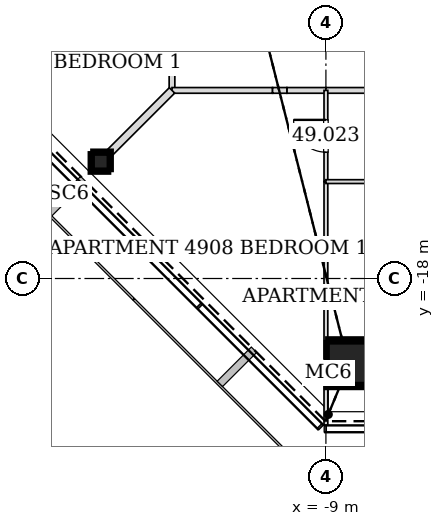
"""IFC4 building model, lengths in metres.
Left out: names, types, materials, properties, quantities, classifications, styles, units other than length and angle.
Written with IfcOpenShell. Run it as: python <this file> out.ifc"""

import sys

from ifc_helpers import new_model, si_unit, direction, frame, frame_2d, origin, origin_2d, place, context, subcontext, project, spatial, rectangle, hollow_rectangle, extrude, element, fill, save


model = new_model("IFC4")
c1 = context("Model", 3, precision=1e-05, world=origin(), true_north=direction((0.0, 1.0)))
c2 = subcontext(c1, "Body", "Model", "MODEL_VIEW")
j1 = project(units=[si_unit("LENGTHUNIT", "METRE"), si_unit("PLANEANGLEUNIT", "RADIAN")], contexts=[c1])
p1 = place(None, origin())
s1 = spatial("IfcSite", under=j1, at=p1, CompositionType="ELEMENT")
p2 = place(p1, origin())
s2 = spatial("IfcBuilding", under=s1, at=p2, CompositionType="ELEMENT")
p3 = place(p2, frame((0.0, 0.0, 214.2)))
s3 = spatial("IfcBuildingStorey", under=s2, at=p3, CompositionType="ELEMENT", Elevation=214.2)
p4 = place(p3, frame((-8.399, -20.277, 0.0), z_axis=(0.011770162649, 0.02827709807, 0.999530824435), x_axis=(-0.923215513192, 0.3842825994, 0.0)))
e1 = element("IfcColumn", 1, at=p4, inside=s3, PredefinedType="COLUMN", context=c2, shape_type="SweptSolid", body=[
    extrude(hollow_rectangle(XDim=1.2, YDim=1.2, WallThickness=0.055, at=origin_2d()), origin(), (0.0, 0.0, 1.0), 3.402),
])
p5 = place(p3, frame((-14.959, -14.959, 0.0), z_axis=(0.019953277583, 0.019953277583, 0.999601787427), x_axis=(-0.707106781187, 0.707106781187, 0.0)))
e2 = element("IfcColumn", 2, at=p5, inside=s3, PredefinedType="COLUMN", context=c2, shape_type="SweptSolid", body=[
    extrude(hollow_rectangle(XDim=0.5, YDim=0.5, WallThickness=0.025, at=origin_2d()), origin(), (0.0, 0.0, 1.0), 3.402),
])
p6 = place(p3, frame((-13.05, -11.649, 0.0), z_axis=(0.0, 0.0, 1.0), x_axis=(0.0, -1.0, 0.0)))
e3 = element("IfcWall", 3, at=p6, inside=s3, PredefinedType="PARTITIONING", context=c2, shape_type="SweptSolid", body=[
    extrude(rectangle(XDim=1.401, YDim=0.15, at=frame_2d((0.701, 0.0))), origin(), (0.0, 0.0, 1.0), 2.578),
])
p7 = place(p3, frame((-13.05, -13.05, 0.0), z_axis=(0.0, 0.0, 1.0), x_axis=(1.0, 0.0, 0.0)))
e4 = element("IfcWall", 4, at=p7, inside=s3, PredefinedType="PARTITIONING", context=c2, shape_type="SweptSolid", body=[
    extrude(rectangle(XDim=2.646, YDim=0.15, at=frame_2d((1.323, 0.0))), origin(), (0.0, 0.0, 1.0), 2.578),
])
p8 = place(p3, frame((-10.027, -13.05, 0.0), z_axis=(0.0, 0.0, 1.0), x_axis=(1.0, 0.0, 0.0)))
e5 = element("IfcWall", 5, at=p8, inside=s3, PredefinedType="PARTITIONING", context=c2, shape_type="SweptSolid", body=[
    extrude(rectangle(XDim=1.028, YDim=0.15, at=frame_2d((0.514, 0.0))), origin(), (0.0, 0.0, 1.0), 3.2),
])
p9 = place(p3, frame((-10.404, -13.05, 0.0), z_axis=(0.0, 0.0, 1.0), x_axis=(1.0, 0.0, 0.0)))
e6 = element("IfcWall", 6, at=p9, inside=s3, PredefinedType="PARTITIONING", context=c2, shape_type="SweptSolid", body=[
    extrude(rectangle(XDim=0.377, YDim=0.15, at=frame_2d((0.188, 0.0))), origin(), (0.0, 0.0, 1.0), 2.268),
])
p10 = place(p3, frame((-9.001, -13.05, 0.0), z_axis=(0.0, 0.0, 1.0), x_axis=(1.0, 0.0, 0.0)))
e7 = element("IfcWall", 7, at=p10, inside=s3, PredefinedType="PARTITIONING", context=c2, shape_type="SweptSolid", body=[
    extrude(rectangle(XDim=5.802, YDim=0.15, at=frame_2d((2.901, 0.0))), origin(), (0.0, 0.0, 1.0), 3.2),
])
p11 = place(p10, frame((2.426, 0.0, 0.0)))
e8 = element("IfcOpeningElement", 8, at=p11, cuts=e7, PredefinedType="OPENING", context=c2, shape_type="SweptSolid", body=[
    extrude(rectangle(XDim=0.95, YDim=2.1, at=frame_2d((0.475, 1.05))), frame((0.0, 0.085, 0.0), z_axis=(0.0, -1.0, 0.0), x_axis=(1.0, 0.0, 0.0)), (0.0, 0.0, 1.0), 0.17),
])
p12 = place(p3, frame((-14.701, -14.701, 0.0), z_axis=(0.0, 0.0, 1.0), x_axis=(0.707106781187, 0.707106781187, 0.0)))
e9 = element("IfcWall", 9, at=p12, inside=s3, PredefinedType="PARTITIONING", context=c2, shape_type="SweptSolid", body=[
    extrude(rectangle(XDim=2.334, YDim=0.2, at=frame_2d((1.167, 0.0))), origin(), (0.0, 0.0, 1.0), 2.578),
])
p13 = place(p3, frame((-9.0, -21.86, 0.0), z_axis=(0.0, 0.0, 1.0), x_axis=(0.0, 1.0, 0.0)))
e10 = element("IfcWall", 10, at=p13, inside=s3, PredefinedType="PARTITIONING", context=c2, shape_type="SweptSolid", body=[
    extrude(rectangle(XDim=1.162, YDim=0.1, at=frame_2d((0.581, 0.0))), origin(), (0.0, 0.0, 1.0), 3.2),
])
p14 = place(p3, frame((-9.0, -20.11, 0.0), z_axis=(0.0, 0.0, 1.0), x_axis=(0.0, 1.0, 0.0)))
e11 = element("IfcWall", 11, at=p14, inside=s3, PredefinedType="PARTITIONING", context=c2, shape_type="SweptSolid", body=[
    extrude(rectangle(XDim=1.656, YDim=0.1, at=frame_2d((0.828, 0.0))), origin(), (0.0, 0.0, 1.0), 2.784),
])
p15 = place(p3, frame((-9.0, -17.004, 0.0), z_axis=(0.0, 0.0, 1.0), x_axis=(0.0, 1.0, 0.0)))
e12 = element("IfcWall", 12, at=p15, inside=s3, PredefinedType="PARTITIONING", context=c2, shape_type="SweptSolid", body=[
    extrude(rectangle(XDim=1.555, YDim=0.1, at=frame_2d((0.777, 0.0))), origin(), (0.0, 0.0, 1.0), 2.664),
])
p16 = place(p3, frame((-9.0, -18.455, 0.0), z_axis=(0.0, 0.0, 1.0), x_axis=(0.0, 1.0, 0.0)))
e13 = element("IfcWall", 13, at=p16, inside=s3, PredefinedType="PARTITIONING", context=c2, shape_type="SweptSolid", body=[
    extrude(rectangle(XDim=1.451, YDim=0.1, at=frame_2d((0.726, 0.0))), origin(), (0.0, 0.0, 1.0), 2.268),
])
p17 = place(p3, frame((-9.0, -15.451, 0.0), z_axis=(0.0, 0.0, 1.0), x_axis=(0.0, 1.0, 0.0)))
e14 = element("IfcWall", 14, at=p17, inside=s3, PredefinedType="PARTITIONING", context=c2, shape_type="SweptSolid", body=[
    extrude(rectangle(XDim=2.401, YDim=0.1, at=frame_2d((1.2, 0.0))), origin(), (0.0, 0.0, 1.0), 2.591),
])
p18 = place(p17, frame((0.775, 0.0, 0.0)))
e15 = element("IfcOpeningElement", 15, at=p18, cuts=e14, PredefinedType="OPENING", context=c2, shape_type="SweptSolid", body=[
    extrude(rectangle(XDim=0.85, YDim=2.1, at=frame_2d((0.425, 1.05))), frame((0.0, 0.06, 0.0), z_axis=(0.0, -1.0, 0.0), x_axis=(1.0, 0.0, 0.0)), (0.0, 0.0, 1.0), 0.12),
])
p19 = place(p3, frame((-5.0, -15.45, 0.0), z_axis=(0.0, 0.0, 1.0), x_axis=(-1.0, 0.0, 0.0)))
e16 = element("IfcWall", 16, at=p19, inside=s3, PredefinedType="PARTITIONING", context=c2, shape_type="SweptSolid", body=[
    extrude(rectangle(XDim=4.0, YDim=0.1, at=frame_2d((2.0, 0.0))), origin(), (0.0, 0.0, 1.0), 3.2),
])
p20 = place(p18, origin())
e17 = element("IfcDoor", 17, at=p20, inside=s3, OperationType="SINGLE_SWING_RIGHT", PredefinedType="DOOR", context=c2, shape_type="SweptSolid", body=[
    extrude(rectangle(XDim=0.85, YDim=2.1, at=frame_2d((0.425, 1.05))), frame((0.0, 0.025, 0.0), z_axis=(0.0, -1.0, 0.0), x_axis=(1.0, 0.0, 0.0)), (0.0, 0.0, 1.0), 0.05),
])
fill(e15, e17)
save(model, sys.argv[1])
